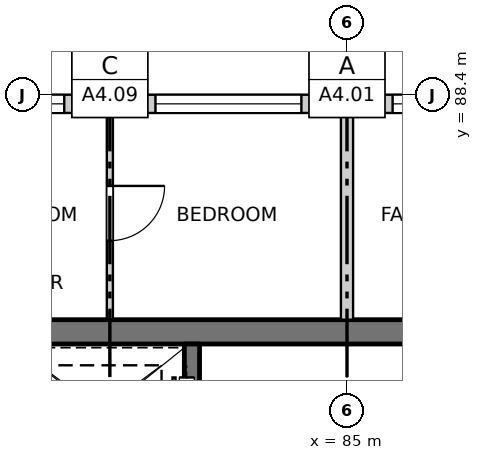
"""IFC4 building model, lengths in metres.
Left out: names, types, materials, properties, quantities, classifications, styles, units other than length and angle.
Written with IfcOpenShell. Run it as: python <this file> out.ifc"""

import sys

from ifc_helpers import new_model, si_unit, direction, frame, frame_2d, origin, place, context, subcontext, project, spatial, rectangle, extrude, element, fill, save


model = new_model("IFC4")
c1 = context("Model", 3, precision=1e-05, world=origin(), true_north=direction((0.0, 1.0)))
c2 = subcontext(c1, "Body", "Model", "MODEL_VIEW")
j1 = project(units=[si_unit("LENGTHUNIT", "METRE"), si_unit("PLANEANGLEUNIT", "RADIAN")], contexts=[c1])
p1 = place(None, origin())
s1 = spatial("IfcSite", under=j1, at=p1, CompositionType="ELEMENT")
p2 = place(p1, origin())
s2 = spatial("IfcBuilding", under=s1, at=p2, CompositionType="ELEMENT")
p3 = place(p2, frame((0.0, 0.0, 238.1)))
s3 = spatial("IfcBuildingStorey", under=s2, at=p3, CompositionType="ELEMENT", Elevation=238.1)
p4 = place(p3, frame((75.45, 84.5, -0.25), z_axis=(0.0, 0.0, 1.0), x_axis=(1.0, 0.0, 0.0)))
e1 = element("IfcWall", 1, at=p4, inside=s3, PredefinedType="SOLIDWALL", context=c2, shape_type="SweptSolid", body=[
    extrude(rectangle(XDim=19.1, YDim=0.4, at=frame_2d((9.55, 0.0))), origin(), (0.0, 0.0, 1.0), 3.35),
])
p5 = place(p3, frame((82.45, 82.025, -0.25), z_axis=(0.0, 0.0, 1.0), x_axis=(0.0, 1.0, 0.0)))
e2 = element("IfcWall", 2, at=p5, inside=s3, PredefinedType="SOLIDWALL", context=c2, shape_type="SweptSolid", body=[
    extrude(rectangle(XDim=2.275, YDim=0.25, at=frame_2d((1.138, 0.0))), origin(), (0.0, 0.0, 1.0), 3.35),
])
p6 = place(p5, frame((0.625, 0.0, 0.25)))
e3 = element("IfcOpeningElement", 3, at=p6, cuts=e2, PredefinedType="OPENING", context=c2, shape_type="SweptSolid", body=[
    extrude(rectangle(XDim=1.1, YDim=2.1, at=frame_2d((0.55, 1.05))), frame((0.0, 0.135, 0.0), z_axis=(0.0, -1.0, 0.0), x_axis=(1.0, 0.0, 0.0)), (0.0, 0.0, 1.0), 0.27),
])
p7 = place(p3, frame((73.7, 88.25, 0.0), z_axis=(0.0, 0.0, 1.0), x_axis=(1.0, 0.0, 0.0)))
e4 = element("IfcWall", 4, at=p7, inside=s3, PredefinedType="SOLIDWALL", context=c2, shape_type="SweptSolid", body=[
    extrude(rectangle(XDim=22.6, YDim=0.3, at=frame_2d((11.3, 0.0))), origin(), (0.0, 0.0, 1.0), 3.1),
])
p8 = place(p7, frame((0.35, 0.0, 0.9)))
e5 = element("IfcOpeningElement", 5, at=p8, cuts=e4, PredefinedType="OPENING", context=c2, shape_type="SweptSolid", body=[
    extrude(rectangle(XDim=2.4, YDim=1.8, at=frame_2d((1.2, 0.9))), frame((0.0, 0.16, 0.0), z_axis=(0.0, -1.0, 0.0), x_axis=(1.0, 0.0, 0.0)), (0.0, 0.0, 1.0), 0.32),
])
p9 = place(p7, frame((4.25, 0.0, 0.9)))
e6 = element("IfcOpeningElement", 6, at=p9, cuts=e4, PredefinedType="OPENING", context=c2, shape_type="SweptSolid", body=[
    extrude(rectangle(XDim=2.4, YDim=1.8, at=frame_2d((1.2, 0.9))), frame((0.0, 0.16, 0.0), z_axis=(0.0, -1.0, 0.0), x_axis=(1.0, 0.0, 0.0)), (0.0, 0.0, 1.0), 0.32),
])
p10 = place(p7, frame((8.15, 0.0, 0.9)))
e7 = element("IfcOpeningElement", 7, at=p10, cuts=e4, PredefinedType="OPENING", context=c2, shape_type="SweptSolid", body=[
    extrude(rectangle(XDim=2.4, YDim=1.8, at=frame_2d((1.2, 0.9))), frame((0.0, 0.16, 0.0), z_axis=(0.0, -1.0, 0.0), x_axis=(1.0, 0.0, 0.0)), (0.0, 0.0, 1.0), 0.32),
])
p11 = place(p7, frame((12.05, 0.0, 0.9)))
e8 = element("IfcOpeningElement", 8, at=p11, cuts=e4, PredefinedType="OPENING", context=c2, shape_type="SweptSolid", body=[
    extrude(rectangle(XDim=2.4, YDim=1.8, at=frame_2d((1.2, 0.9))), frame((0.0, 0.16, 0.0), z_axis=(0.0, -1.0, 0.0), x_axis=(1.0, 0.0, 0.0)), (0.0, 0.0, 1.0), 0.32),
])
p12 = place(p7, frame((15.95, 0.0, 0.9)))
e9 = element("IfcOpeningElement", 9, at=p12, cuts=e4, PredefinedType="OPENING", context=c2, shape_type="SweptSolid", body=[
    extrude(rectangle(XDim=2.4, YDim=1.8, at=frame_2d((1.2, 0.9))), frame((0.0, 0.16, 0.0), z_axis=(0.0, -1.0, 0.0), x_axis=(1.0, 0.0, 0.0)), (0.0, 0.0, 1.0), 0.32),
])
p13 = place(p7, frame((19.85, 0.0, 0.9)))
e10 = element("IfcOpeningElement", 10, at=p13, cuts=e4, PredefinedType="OPENING", context=c2, shape_type="SweptSolid", body=[
    extrude(rectangle(XDim=2.4, YDim=1.8, at=frame_2d((1.2, 0.9))), frame((0.0, 0.16, 0.0), z_axis=(0.0, -1.0, 0.0), x_axis=(1.0, 0.0, 0.0)), (0.0, 0.0, 1.0), 0.32),
])
p14 = place(p3, frame((81.1, 84.7, 0.0), z_axis=(0.0, 0.0, 1.0), x_axis=(0.0, 1.0, 0.0)))
e11 = element("IfcWall", 11, at=p14, inside=s3, PredefinedType="PARTITIONING", context=c2, shape_type="SweptSolid", body=[
    extrude(rectangle(XDim=3.4, YDim=0.1, at=frame_2d((1.7, 0.0))), origin(), (0.0, 0.0, 1.0), 3.1),
])
p15 = place(p14, frame((1.3, 0.0, 0.0)))
e12 = element("IfcOpeningElement", 12, at=p15, cuts=e11, PredefinedType="OPENING", context=c2, shape_type="SweptSolid", body=[
    extrude(rectangle(XDim=0.9, YDim=2.1, at=frame_2d((0.45, 1.05))), frame((0.0, 0.06, 0.0), z_axis=(0.0, -1.0, 0.0), x_axis=(1.0, 0.0, 0.0)), (0.0, 0.0, 1.0), 0.12),
])
p16 = place(p3, frame((85.0, 84.7, 0.0), z_axis=(0.0, 0.0, 1.0), x_axis=(0.0, 1.0, 0.0)))
e13 = element("IfcWall", 13, at=p16, inside=s3, PredefinedType="PARTITIONING", context=c2, shape_type="SweptSolid", body=[
    extrude(rectangle(XDim=3.4, YDim=0.2, at=frame_2d((1.7, 0.0))), origin(), (0.0, 0.0, 1.0), 3.1),
])
p17 = place(p9, origin())
e14 = element("IfcWindow", 14, at=p17, inside=s3, PartitioningType="DOUBLE_PANEL_VERTICAL", PredefinedType="WINDOW", context=c2, shape_type="SweptSolid", body=[
    extrude(rectangle(XDim=2.4, YDim=1.8, at=frame_2d((1.2, 0.9))), frame((0.0, 0.03, 0.0), z_axis=(0.0, -1.0, 0.0), x_axis=(1.0, 0.0, 0.0)), (0.0, 0.0, 1.0), 0.06),
])
fill(e6, e14)
p18 = place(p10, origin())
e15 = element("IfcWindow", 15, at=p18, inside=s3, PartitioningType="DOUBLE_PANEL_VERTICAL", PredefinedType="WINDOW", context=c2, shape_type="SweptSolid", body=[
    extrude(rectangle(XDim=2.4, YDim=1.8, at=frame_2d((1.2, 0.9))), frame((0.0, 0.03, 0.0), z_axis=(0.0, -1.0, 0.0), x_axis=(1.0, 0.0, 0.0)), (0.0, 0.0, 1.0), 0.06),
])
fill(e7, e15)
p19 = place(p11, origin())
e16 = element("IfcWindow", 16, at=p19, inside=s3, PartitioningType="DOUBLE_PANEL_VERTICAL", PredefinedType="WINDOW", context=c2, shape_type="SweptSolid", body=[
    extrude(rectangle(XDim=2.4, YDim=1.8, at=frame_2d((1.2, 0.9))), frame((0.0, 0.03, 0.0), z_axis=(0.0, -1.0, 0.0), x_axis=(1.0, 0.0, 0.0)), (0.0, 0.0, 1.0), 0.06),
])
fill(e8, e16)
p20 = place(p6, origin())
e17 = element("IfcDoor", 17, at=p20, inside=s3, OperationType="SLIDING_TO_RIGHT", PredefinedType="DOOR", context=c2, shape_type="SweptSolid", body=[
    extrude(rectangle(XDim=1.1, YDim=2.1, at=frame_2d((0.55, 1.05))), frame((0.0, 0.11, 0.0), z_axis=(0.0, -1.0, 0.0), x_axis=(1.0, 0.0, 0.0)), (0.0, 0.0, 1.0), 0.05),
])
fill(e3, e17)
p21 = place(p15, origin())
e18 = element("IfcDoor", 18, at=p21, inside=s3, OperationType="SINGLE_SWING_LEFT", PredefinedType="DOOR", context=c2, shape_type="SweptSolid", body=[
    extrude(rectangle(XDim=0.9, YDim=2.1, at=frame_2d((0.45, 1.05))), frame((0.0, 0.025, 0.0), z_axis=(0.0, -1.0, 0.0), x_axis=(1.0, 0.0, 0.0)), (0.0, 0.0, 1.0), 0.05),
])
fill(e12, e18)
save(model, sys.argv[1])
